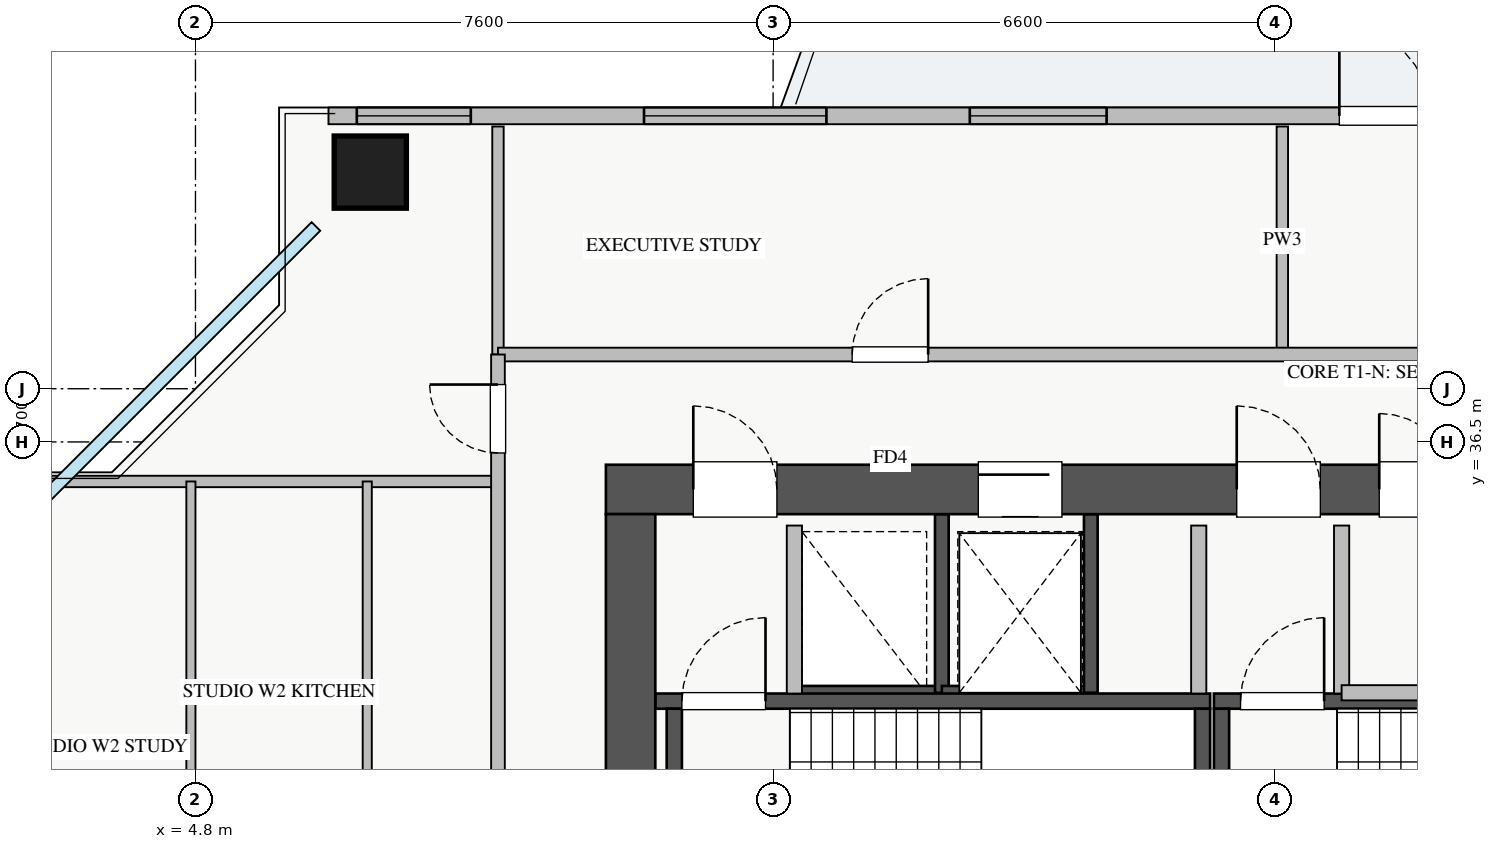
"""IFC4 building model, lengths in metres.
Left out: names, types, materials, properties, quantities, classifications, styles, units other than length and angle.
Written with IfcOpenShell. Run it as: python <this file> out.ifc"""

import sys

from ifc_helpers import new_model, si_unit, direction, frame, frame_2d, origin, origin_2d, place, context, subcontext, project, spatial, rectangle, extrude, source, transform, mapped, element, fill, save


model = new_model("IFC4")
c1 = context("Model", 3, precision=1e-05, world=origin(), true_north=direction((0.0, 1.0)))
c2 = subcontext(c1, "Body", "Model", "MODEL_VIEW")
j1 = project(units=[si_unit("LENGTHUNIT", "METRE"), si_unit("PLANEANGLEUNIT", "RADIAN")], contexts=[c1])
p1 = place(None, origin())
s1 = spatial("IfcSite", under=j1, at=p1, CompositionType="ELEMENT")
p2 = place(p1, origin())
s2 = spatial("IfcBuilding", under=s1, at=p2, CompositionType="ELEMENT")
p3 = place(p2, frame((0.0, 0.0, 176.25)))
s3 = spatial("IfcBuildingStorey", under=s2, at=p3, CompositionType="ELEMENT", Elevation=176.25)
p4 = place(p3, frame((12.68, 33.2, 0.0), z_axis=(0.0, 0.0, 1.0), x_axis=(1.0, 0.0, 0.0)))
e1 = element("IfcWall", 1, at=p4, inside=s3, PredefinedType="SHEAR", context=c2, shape_type="SweptSolid", body=[
    extrude(rectangle(XDim=1.94, YDim=0.18, at=frame_2d((0.97, 0.0))), origin(), (0.0, 0.0, 1.0), 3.07),
])
p5 = place(p3, frame((14.62, 33.2, 0.0), z_axis=(0.0, 0.0, 1.0), x_axis=(0.0, 1.0, 0.0)))
e2 = element("IfcWall", 2, at=p5, inside=s3, PredefinedType="SHEAR", context=c2, shape_type="SweptSolid", body=[
    extrude(rectangle(XDim=2.35, YDim=0.18, at=frame_2d((1.175, 0.0))), origin(), (0.0, 0.0, 1.0), 3.07),
])
p6 = place(p3, frame((14.62, 33.2, 0.0), z_axis=(0.0, 0.0, 1.0), x_axis=(1.0, 0.0, 0.0)))
e3 = element("IfcWall", 3, at=p6, inside=s3, PredefinedType="SHEAR", context=c2, shape_type="SweptSolid", body=[
    extrude(rectangle(XDim=1.96, YDim=0.18, at=frame_2d((0.98, 0.0))), origin(), (0.0, 0.0, 1.0), 3.07),
])
p7 = place(p3, frame((16.58, 33.2, 0.0), z_axis=(0.0, 0.0, 1.0), x_axis=(0.0, 1.0, 0.0)))
e4 = element("IfcWall", 4, at=p7, inside=s3, PredefinedType="SHEAR", context=c2, shape_type="SweptSolid", body=[
    extrude(rectangle(XDim=2.35, YDim=0.18, at=frame_2d((1.175, 0.0))), origin(), (0.0, 0.0, 1.0), 3.07),
])
p8 = place(p3, frame((10.85, 33.09, 0.0), z_axis=(0.0, 0.0, 1.0), x_axis=(1.0, 0.0, 0.0)))
e5 = element("IfcWall", 5, at=p8, inside=s3, PredefinedType="SHEAR", context=c2, shape_type="SweptSolid", body=[
    extrude(rectangle(XDim=7.3, YDim=0.2, at=frame_2d((3.65, 0.0))), origin(), (0.0, 0.0, 1.0), 3.25),
])
p9 = place(p8, frame((0.35, 0.0, 0.0)))
e6 = element("IfcOpeningElement", 6, at=p9, cuts=e5, PredefinedType="OPENING", context=c2, shape_type="SweptSolid", body=[
    extrude(rectangle(XDim=1.1, YDim=2.05, at=frame_2d((0.55, 1.025))), frame((0.0, 0.11, 0.0), z_axis=(0.0, -1.0, 0.0), x_axis=(1.0, 0.0, 0.0)), (0.0, 0.0, 1.0), 0.22),
])
for number, where, z_axis, x_axis in (
    (7, (11.1, 30.05, 0.0), (0.0, 0.0, 1.0), (0.0, 1.0, 0.0)),
    (8, (18.05, 30.05, 0.0), (0.0, 0.0, 1.0), (0.0, 1.0, 0.0)),
):
    element("IfcWall", number, at=place(p3, frame(where, z_axis=z_axis, x_axis=x_axis)), inside=s3, PredefinedType="SHEAR", context=c2, shape_type="SweptSolid", body=[
        extrude(rectangle(XDim=2.94, YDim=0.2, at=frame_2d((1.47, 0.0))), origin(), (0.0, 0.0, 1.0), 3.25),
    ])
p10 = place(p3, frame((18.2, 33.09, 0.0), z_axis=(0.0, 0.0, 1.0), x_axis=(1.0, 0.0, 0.0)))
e9 = element("IfcWall", 9, at=p10, inside=s3, PredefinedType="SHEAR", context=c2, shape_type="SweptSolid", body=[
    extrude(rectangle(XDim=7.15, YDim=0.2, at=frame_2d((3.575, 0.0))), origin(), (0.0, 0.0, 1.0), 3.25),
])
p11 = place(p10, frame((0.35, 0.0, 0.0)))
e10 = element("IfcOpeningElement", 10, at=p11, cuts=e9, PredefinedType="OPENING", context=c2, shape_type="SweptSolid", body=[
    extrude(rectangle(XDim=1.1, YDim=2.05, at=frame_2d((0.55, 1.025))), frame((0.0, 0.11, 0.0), z_axis=(0.0, -1.0, 0.0), x_axis=(1.0, 0.0, 0.0)), (0.0, 0.0, 1.0), 0.22),
])
p12 = place(p3, frame((18.3, 30.05, 0.0), z_axis=(0.0, 0.0, 1.0), x_axis=(0.0, 1.0, 0.0)))
e11 = element("IfcWall", 11, at=p12, inside=s3, PredefinedType="SHEAR", context=c2, shape_type="SweptSolid", body=[
    extrude(rectangle(XDim=2.94, YDim=0.2, at=frame_2d((1.47, 0.0))), origin(), (0.0, 0.0, 1.0), 3.25),
])
p13 = place(p3, frame((10.2, 35.875, 0.0), z_axis=(0.0, 0.0, 1.0), x_axis=(1.0, 0.0, 0.0)))
e12 = element("IfcWall", 12, at=p13, inside=s3, PredefinedType="SHEAR", context=c2, shape_type="SweptSolid", body=[
    extrude(rectangle(XDim=17.6, YDim=0.65, at=frame_2d((8.8, 0.0))), origin(), (0.0, 0.0, 1.0), 3.25),
])
p14 = place(p13, frame((1.15, 0.0, 0.0)))
e13 = element("IfcOpeningElement", 13, at=p14, cuts=e12, PredefinedType="OPENING", context=c2, shape_type="SweptSolid", body=[
    extrude(rectangle(XDim=1.1, YDim=2.05, at=frame_2d((0.55, 1.025))), frame((0.0, 0.335, 0.0), z_axis=(0.0, -1.0, 0.0), x_axis=(1.0, 0.0, 0.0)), (0.0, 0.0, 1.0), 0.67),
])
p15 = place(p13, frame((8.3, 0.0, 0.0)))
e14 = element("IfcOpeningElement", 14, at=p15, cuts=e12, PredefinedType="OPENING", context=c2, shape_type="SweptSolid", body=[
    extrude(rectangle(XDim=1.1, YDim=2.05, at=frame_2d((0.55, 1.025))), frame((0.0, 0.335, 0.0), z_axis=(0.0, -1.0, 0.0), x_axis=(1.0, 0.0, 0.0)), (0.0, 0.0, 1.0), 0.67),
])
p16 = place(p13, frame((4.9, 0.0, 0.0)))
e15 = element("IfcOpeningElement", 15, at=p16, cuts=e12, PredefinedType="OPENING", context=c2, shape_type="SweptSolid", body=[
    extrude(rectangle(XDim=1.1, YDim=2.05, at=frame_2d((0.55, 1.025))), frame((0.0, 0.335, 0.0), z_axis=(0.0, -1.0, 0.0), x_axis=(1.0, 0.0, 0.0)), (0.0, 0.0, 1.0), 0.67),
])
p17 = place(p13, frame((14.74, 0.0, 0.0)))
e16 = element("IfcOpeningElement", 16, at=p17, cuts=e12, PredefinedType="OPENING", context=c2, shape_type="SweptSolid", body=[
    extrude(rectangle(XDim=1.0, YDim=2.05, at=frame_2d((0.5, 1.025))), frame((0.0, 0.335, 0.0), z_axis=(0.0, -1.0, 0.0), x_axis=(1.0, 0.0, 0.0)), (0.0, 0.0, 1.0), 0.67),
])
p18 = place(p13, frame((10.175, 0.0, 0.0)))
e17 = element("IfcOpeningElement", 17, at=p18, cuts=e12, PredefinedType="OPENING", context=c2, shape_type="SweptSolid", body=[
    extrude(rectangle(XDim=1.0, YDim=2.05, at=frame_2d((0.5, 1.025))), frame((0.0, 0.335, 0.0), z_axis=(0.0, -1.0, 0.0), x_axis=(1.0, 0.0, 0.0)), (0.0, 0.0, 1.0), 0.67),
])
p19 = place(p13, frame((12.625, 0.0, 0.0)))
e18 = element("IfcOpeningElement", 18, at=p19, cuts=e12, PredefinedType="OPENING", context=c2, shape_type="SweptSolid", body=[
    extrude(rectangle(XDim=1.0, YDim=2.05, at=frame_2d((0.5, 1.025))), frame((0.0, 0.335, 0.0), z_axis=(0.0, -1.0, 0.0), x_axis=(1.0, 0.0, 0.0)), (0.0, 0.0, 1.0), 0.67),
])
p20 = place(p3, frame((10.525, 29.65, 0.0), z_axis=(0.0, 0.0, 1.0), x_axis=(0.0, 1.0, 0.0)))
e19 = element("IfcWall", 19, at=p20, inside=s3, PredefinedType="SHEAR", context=c2, shape_type="SweptSolid", body=[
    extrude(rectangle(XDim=5.9, YDim=0.65, at=frame_2d((2.95, 0.0))), origin(), (0.0, 0.0, 1.0), 3.25),
])
m1 = source(origin(), c2, "Body", "SweptSolid", [
    extrude(rectangle(XDim=0.95, YDim=0.95, at=origin_2d()), origin(), (0.0, 0.0, 1.0), 3.25),
])
p21 = place(p3, frame((7.1, 40.05, 0.0), z_axis=(0.0, 0.0, 1.0), x_axis=(1.0, 0.0, 0.0)))
e20 = element("IfcColumn", 20, at=p21, inside=s3, PredefinedType="COLUMN", context=c2, shape_type="MappedRepresentation", body=[
    mapped(m1, transform((0.0, 0.0, 0.0), x_axis=(1.0, 0.0, 0.0), y_axis=(0.0, 1.0, 0.0), z_axis=(0.0, 0.0, 1.0), scale=1.0)),
])
p22 = place(p3, frame((6.55, 40.79, 0.0), z_axis=(0.0, 0.0, 1.0), x_axis=(1.0, 0.0, 0.0)))
e21 = element("IfcWall", 21, at=p22, inside=s3, PredefinedType="STANDARD", context=c2, shape_type="SweptSolid", body=[
    extrude(rectangle(XDim=24.9, YDim=0.22, at=frame_2d((12.45, 0.0))), origin(), (0.0, 0.0, 1.0), 2.61),
])
p23 = place(p22, frame((13.3, 0.0, 0.0)))
e22 = element("IfcOpeningElement", 22, at=p23, cuts=e21, PredefinedType="OPENING", context=c2, shape_type="SweptSolid", body=[
    extrude(rectangle(XDim=1.2, YDim=2.1, at=frame_2d((0.6, 1.05))), frame((0.0, 0.12, 0.0), z_axis=(0.0, -1.0, 0.0), x_axis=(1.0, 0.0, 0.0)), (0.0, 0.0, 1.0), 0.24),
])
p24 = place(p22, frame((0.373, 0.0, 0.9)))
e23 = element("IfcOpeningElement", 23, at=p24, cuts=e21, PredefinedType="OPENING", context=c2, shape_type="SweptSolid", body=[
    extrude(rectangle(XDim=1.5, YDim=1.5, at=frame_2d((0.75, 0.75))), frame((0.0, 0.12, 0.0), z_axis=(0.0, -1.0, 0.0), x_axis=(1.0, 0.0, 0.0)), (0.0, 0.0, 1.0), 0.24),
])
p25 = place(p22, frame((8.438, 0.0, 0.9)))
e24 = element("IfcOpeningElement", 24, at=p25, cuts=e21, PredefinedType="OPENING", context=c2, shape_type="SweptSolid", body=[
    extrude(rectangle(XDim=1.8, YDim=1.45, at=frame_2d((0.9, 0.725))), frame((0.0, 0.12, 0.0), z_axis=(0.0, -1.0, 0.0), x_axis=(1.0, 0.0, 0.0)), (0.0, 0.0, 1.0), 0.24),
])
p26 = place(p22, frame((14.813, 0.0, 0.9)))
e25 = element("IfcOpeningElement", 25, at=p26, cuts=e21, PredefinedType="OPENING", context=c2, shape_type="SweptSolid", body=[
    extrude(rectangle(XDim=1.5, YDim=1.45, at=frame_2d((0.75, 0.725))), frame((0.0, 0.12, 0.0), z_axis=(0.0, -1.0, 0.0), x_axis=(1.0, 0.0, 0.0)), (0.0, 0.0, 1.0), 0.24),
])
p27 = place(p22, frame((20.738, 0.0, 0.9)))
e26 = element("IfcOpeningElement", 26, at=p27, cuts=e21, PredefinedType="OPENING", context=c2, shape_type="SweptSolid", body=[
    extrude(rectangle(XDim=2.1, YDim=1.48, at=frame_2d((1.05, 0.74))), frame((0.0, 0.12, 0.0), z_axis=(0.0, -1.0, 0.0), x_axis=(1.0, 0.0, 0.0)), (0.0, 0.0, 1.0), 0.24),
])
p28 = place(p22, frame((4.152, 0.0, 0.9)))
e27 = element("IfcOpeningElement", 27, at=p28, cuts=e21, PredefinedType="OPENING", context=c2, shape_type="SweptSolid", body=[
    extrude(rectangle(XDim=2.4, YDim=1.5, at=frame_2d((1.2, 0.75))), frame((0.0, 0.12, 0.0), z_axis=(0.0, -1.0, 0.0), x_axis=(1.0, 0.0, 0.0)), (0.0, 0.0, 1.0), 0.24),
])
for number, where, z_axis, x_axis in (
    (28, (12.68, 33.19, 0.0), (0.0, 0.0, 1.0), (0.0, 1.0, 0.0)),
    (29, (18.0, 33.19, 0.0), (0.0, 0.0, 1.0), (0.0, 1.0, 0.0)),
    (30, (19.88, 33.19, 0.0), (0.0, 0.0, 1.0), (0.0, 1.0, 0.0)),
):
    element("IfcWall", number, at=place(p3, frame(where, z_axis=z_axis, x_axis=x_axis)), inside=s3, PredefinedType="PARTITIONING", context=c2, shape_type="SweptSolid", body=[
        extrude(rectangle(XDim=2.21, YDim=0.2, at=frame_2d((1.105, 0.0))), origin(), (0.0, 0.0, 1.0), 3.07),
    ])
p29 = place(p3, frame((19.88, 33.2, 0.0), z_axis=(0.0, 0.0, 1.0), x_axis=(1.0, 0.0, 0.0)))
e31 = element("IfcWall", 31, at=p29, inside=s3, PredefinedType="PARTITIONING", context=c2, shape_type="SweptSolid", body=[
    extrude(rectangle(XDim=1.87, YDim=0.2, at=frame_2d((0.935, 0.0))), origin(), (0.0, 0.0, 1.0), 3.07),
])
p30 = place(p3, frame((19.1, 37.65, 0.0), z_axis=(0.0, 0.0, 1.0), x_axis=(0.0, 1.0, 0.0)))
e32 = element("IfcWall", 32, at=p30, inside=s3, PredefinedType="PARTITIONING", context=c2, shape_type="SweptSolid", body=[
    extrude(rectangle(XDim=3.0, YDim=0.15, at=frame_2d((1.5, 0.0))), origin(), (0.0, 0.0, 1.0), 2.815),
])
p31 = place(p3, frame((8.78, 37.65, 0.0), z_axis=(0.0, 0.0, 1.0), x_axis=(0.0, 1.0, 0.0)))
e33 = element("IfcWall", 33, at=p31, inside=s3, PredefinedType="PARTITIONING", context=c2, shape_type="SweptSolid", body=[
    extrude(rectangle(XDim=3.0, YDim=0.15, at=frame_2d((1.5, 0.0))), origin(), (0.0, 0.0, 1.0), 3.07),
])
p32 = place(p3, frame((8.78, 37.65, 0.0), z_axis=(0.0, 0.0, 1.0), x_axis=(1.0, 0.0, 0.0)))
e34 = element("IfcWall", 34, at=p32, inside=s3, PredefinedType="PARTITIONING", context=c2, shape_type="SweptSolid", body=[
    extrude(rectangle(XDim=23.54, YDim=0.18, at=frame_2d((11.77, 0.0))), origin(), (0.0, 0.0, 1.0), 3.07),
])
p33 = place(p32, frame((4.66, 0.0, 0.0)))
e35 = element("IfcOpeningElement", 35, at=p33, cuts=e34, PredefinedType="OPENING", context=c2, shape_type="SweptSolid", body=[
    extrude(rectangle(XDim=1.0, YDim=2.05, at=frame_2d((0.5, 1.025))), frame((0.0, 0.1, 0.0), z_axis=(0.0, -1.0, 0.0), x_axis=(1.0, 0.0, 0.0)), (0.0, 0.0, 1.0), 0.2),
])
p34 = place(p32, frame((16.26, 0.0, 0.0)))
e36 = element("IfcOpeningElement", 36, at=p34, cuts=e34, PredefinedType="OPENING", context=c2, shape_type="SweptSolid", body=[
    extrude(rectangle(XDim=1.0, YDim=2.05, at=frame_2d((0.5, 1.025))), frame((0.0, 0.1, 0.0), z_axis=(0.0, -1.0, 0.0), x_axis=(1.0, 0.0, 0.0)), (0.0, 0.0, 1.0), 0.2),
])
p35 = place(p3, frame((2.4, 35.98, 0.0), z_axis=(0.0, 0.0, 1.0), x_axis=(1.0, 0.0, 0.0)))
e37 = element("IfcWall", 37, at=p35, inside=s3, PredefinedType="PARTITIONING", context=c2, shape_type="SweptSolid", body=[
    extrude(rectangle(XDim=6.38, YDim=0.15, at=frame_2d((3.19, 0.0))), origin(), (0.0, 0.0, 1.0), 3.07),
])
p36 = place(p3, frame((4.74, 29.42, 0.0), z_axis=(0.0, 0.0, 1.0), x_axis=(0.0, 1.0, 0.0)))
e38 = element("IfcWall", 38, at=p36, inside=s3, PredefinedType="PLUMBINGWALL", context=c2, shape_type="SweptSolid", body=[
    extrude(rectangle(XDim=6.56, YDim=0.12, at=frame_2d((3.28, 0.0))), origin(), (0.0, 0.0, 1.0), 3.07),
])
p37 = place(p3, frame((7.06, 29.42, 0.0), z_axis=(0.0, 0.0, 1.0), x_axis=(0.0, 1.0, 0.0)))
e39 = element("IfcWall", 39, at=p37, inside=s3, PredefinedType="PLUMBINGWALL", context=c2, shape_type="SweptSolid", body=[
    extrude(rectangle(XDim=6.56, YDim=0.12, at=frame_2d((3.28, 0.0))), origin(), (0.0, 0.0, 1.0), 2.565),
])
p38 = place(p3, frame((8.78, 8.31, 0.0), z_axis=(0.0, 0.0, 1.0), x_axis=(0.0, 1.0, 0.0)))
e40 = element("IfcWall", 40, at=p38, inside=s3, PredefinedType="PARTITIONING", context=c2, shape_type="SweptSolid", body=[
    extrude(rectangle(XDim=29.34, YDim=0.18, at=frame_2d((14.67, 0.0))), origin(), (0.0, 0.0, 1.0), 3.07),
])
p39 = place(p38, frame((28.045, 0.0, 0.0)))
e41 = element("IfcOpeningElement", 41, at=p39, cuts=e40, PredefinedType="OPENING", context=c2, shape_type="SweptSolid", body=[
    extrude(rectangle(XDim=0.9, YDim=2.05, at=frame_2d((0.45, 1.025))), frame((0.0, 0.1, 0.0), z_axis=(0.0, -1.0, 0.0), x_axis=(1.0, 0.0, 0.0)), (0.0, 0.0, 1.0), 0.2),
])
p40 = place(p38, frame((0.24, 0.0, 0.0)))
e42 = element("IfcOpeningElement", 42, at=p40, cuts=e40, PredefinedType="OPENING", context=c2, shape_type="SweptSolid", body=[
    extrude(rectangle(XDim=0.9, YDim=2.05, at=frame_2d((0.45, 1.025))), frame((0.0, 0.1, 0.0), z_axis=(0.0, -1.0, 0.0), x_axis=(1.0, 0.0, 0.0)), (0.0, 0.0, 1.0), 0.2),
])
p41 = place(p38, frame((7.705, 0.0, 0.0)))
e43 = element("IfcOpeningElement", 43, at=p41, cuts=e40, PredefinedType="OPENING", context=c2, shape_type="SweptSolid", body=[
    extrude(rectangle(XDim=1.0, YDim=2.05, at=frame_2d((0.5, 1.025))), frame((0.0, 0.1, 0.0), z_axis=(0.0, -1.0, 0.0), x_axis=(1.0, 0.0, 0.0)), (0.0, 0.0, 1.0), 0.2),
])
p42 = place(p38, frame((17.39, 0.0, 0.0)))
e44 = element("IfcOpeningElement", 44, at=p42, cuts=e40, PredefinedType="OPENING", context=c2, shape_type="SweptSolid", body=[
    extrude(rectangle(XDim=1.0, YDim=2.05, at=frame_2d((0.5, 1.025))), frame((0.0, 0.1, 0.0), z_axis=(0.0, -1.0, 0.0), x_axis=(1.0, 0.0, 0.0)), (0.0, 0.0, 1.0), 0.2),
])
m2 = source(origin(), c2, "Body", "SweptSolid", [
    extrude(rectangle(XDim=1.2, YDim=2.1, at=frame_2d((0.6, 1.05))), frame((0.0, 0.025, 0.0), z_axis=(0.0, -1.0, 0.0), x_axis=(1.0, 0.0, 0.0)), (0.0, 0.0, 1.0), 0.05),
])
p43 = place(p23, origin())
e45 = element("IfcDoor", 45, at=p43, inside=s3, OperationType="SINGLE_SWING_LEFT", PredefinedType="DOOR", context=c2, shape_type="MappedRepresentation", body=[
    mapped(m2, transform((0.0, 0.0, 0.0), x_axis=(1.0, 0.0, 0.0), y_axis=(0.0, 1.0, 0.0), z_axis=(0.0, 0.0, 1.0), scale=1.0)),
])
fill(e22, e45)
m3 = source(origin(), c2, "Body", "SweptSolid", [
    extrude(rectangle(XDim=1.5, YDim=1.5, at=frame_2d((0.75, 0.75))), frame((0.0, 0.03, 0.0), z_axis=(0.0, -1.0, 0.0), x_axis=(1.0, 0.0, 0.0)), (0.0, 0.0, 1.0), 0.06),
])
p44 = place(p24, origin())
e46 = element("IfcWindow", 46, at=p44, inside=s3, PartitioningType="TRIPLE_PANEL_VERTICAL", PredefinedType="WINDOW", context=c2, shape_type="MappedRepresentation", body=[
    mapped(m3, transform((0.0, 0.0, 0.0), x_axis=(1.0, 0.0, 0.0), y_axis=(0.0, 1.0, 0.0), z_axis=(0.0, 0.0, 1.0), scale=1.0)),
])
fill(e23, e46)
m4 = source(origin(), c2, "Body", "SweptSolid", [
    extrude(rectangle(XDim=1.8, YDim=1.45, at=frame_2d((0.9, 0.725))), frame((0.0, 0.03, 0.0), z_axis=(0.0, -1.0, 0.0), x_axis=(1.0, 0.0, 0.0)), (0.0, 0.0, 1.0), 0.06),
])
p45 = place(p25, origin())
e47 = element("IfcWindow", 47, at=p45, inside=s3, PartitioningType="DOUBLE_PANEL_VERTICAL", PredefinedType="WINDOW", context=c2, shape_type="MappedRepresentation", body=[
    mapped(m4, transform((0.0, 0.0, 0.0), x_axis=(1.0, 0.0, 0.0), y_axis=(0.0, 1.0, 0.0), z_axis=(0.0, 0.0, 1.0), scale=1.0)),
])
fill(e24, e47)
m5 = source(origin(), c2, "Body", "SweptSolid", [
    extrude(rectangle(XDim=1.1, YDim=2.05, at=frame_2d((0.55, 1.025))), frame((0.0, 0.025, 0.0), z_axis=(0.0, -1.0, 0.0), x_axis=(1.0, 0.0, 0.0)), (0.0, 0.0, 1.0), 0.05),
])
p46 = place(p14, origin())
e48 = element("IfcDoor", 48, at=p46, inside=s3, OperationType="SINGLE_SWING_LEFT", PredefinedType="DOOR", context=c2, shape_type="MappedRepresentation", body=[
    mapped(m5, transform((0.0, 0.0, 0.0), x_axis=(1.0, 0.0, 0.0), y_axis=(0.0, 1.0, 0.0), z_axis=(0.0, 0.0, 1.0), scale=1.0)),
])
fill(e13, e48)
p47 = place(p9, origin())
e49 = element("IfcDoor", 49, at=p47, inside=s3, OperationType="SINGLE_SWING_RIGHT", PredefinedType="DOOR", context=c2, shape_type="MappedRepresentation", body=[
    mapped(m5, transform((0.0, 0.0, 0.0), x_axis=(1.0, 0.0, 0.0), y_axis=(0.0, 1.0, 0.0), z_axis=(0.0, 0.0, 1.0), scale=1.0)),
])
fill(e6, e49)
p48 = place(p15, origin())
e50 = element("IfcDoor", 50, at=p48, inside=s3, OperationType="SINGLE_SWING_LEFT", PredefinedType="DOOR", context=c2, shape_type="MappedRepresentation", body=[
    mapped(m5, transform((0.0, 0.0, 0.0), x_axis=(1.0, 0.0, 0.0), y_axis=(0.0, 1.0, 0.0), z_axis=(0.0, 0.0, 1.0), scale=1.0)),
])
fill(e14, e50)
p49 = place(p11, origin())
e51 = element("IfcDoor", 51, at=p49, inside=s3, OperationType="SINGLE_SWING_RIGHT", PredefinedType="DOOR", context=c2, shape_type="MappedRepresentation", body=[
    mapped(m5, transform((0.0, 0.0, 0.0), x_axis=(1.0, 0.0, 0.0), y_axis=(0.0, 1.0, 0.0), z_axis=(0.0, 0.0, 1.0), scale=1.0)),
])
fill(e10, e51)
p50 = place(p16, origin())
e52 = element("IfcDoor", 52, at=p50, inside=s3, OperationType="SLIDING_TO_LEFT", PredefinedType="DOOR", context=c2, shape_type="MappedRepresentation", body=[
    mapped(m5, transform((0.0, 0.0, 0.0), x_axis=(1.0, 0.0, 0.0), y_axis=(0.0, 1.0, 0.0), z_axis=(0.0, 0.0, 1.0), scale=1.0)),
])
fill(e15, e52)
m6 = source(origin(), c2, "Body", "SweptSolid", [
    extrude(rectangle(XDim=1.0, YDim=2.05, at=frame_2d((0.5, 1.025))), frame((0.0, 0.025, 0.0), z_axis=(0.0, -1.0, 0.0), x_axis=(1.0, 0.0, 0.0)), (0.0, 0.0, 1.0), 0.05),
])
p51 = place(p18, origin())
e53 = element("IfcDoor", 53, at=p51, inside=s3, OperationType="SINGLE_SWING_LEFT", PredefinedType="DOOR", context=c2, shape_type="MappedRepresentation", body=[
    mapped(m6, transform((0.0, 0.0, 0.0), x_axis=(1.0, 0.0, 0.0), y_axis=(0.0, 1.0, 0.0), z_axis=(0.0, 0.0, 1.0), scale=1.0)),
])
fill(e17, e53)
p52 = place(p33, origin())
e54 = element("IfcDoor", 54, at=p52, inside=s3, OperationType="SINGLE_SWING_RIGHT", PredefinedType="DOOR", context=c2, shape_type="MappedRepresentation", body=[
    mapped(m6, transform((0.0, 0.0, 0.0), x_axis=(1.0, 0.0, 0.0), y_axis=(0.0, 1.0, 0.0), z_axis=(0.0, 0.0, 1.0), scale=1.0)),
])
fill(e35, e54)
m7 = source(origin(), c2, "Body", "SweptSolid", [
    extrude(rectangle(XDim=0.9, YDim=2.05, at=frame_2d((0.45, 1.025))), frame((0.0, 0.025, 0.0), z_axis=(0.0, -1.0, 0.0), x_axis=(1.0, 0.0, 0.0)), (0.0, 0.0, 1.0), 0.05),
])
p53 = place(p39, origin())
e55 = element("IfcDoor", 55, at=p53, inside=s3, OperationType="SINGLE_SWING_RIGHT", PredefinedType="DOOR", context=c2, shape_type="MappedRepresentation", body=[
    mapped(m7, transform((0.0, 0.0, 0.0), x_axis=(1.0, 0.0, 0.0), y_axis=(0.0, 1.0, 0.0), z_axis=(0.0, 0.0, 1.0), scale=1.0)),
])
fill(e41, e55)
m8 = source(origin(), c2, "Body", "SweptSolid", [
    extrude(rectangle(XDim=2.4, YDim=1.5, at=frame_2d((1.2, 0.75))), frame((0.0, 0.03, 0.0), z_axis=(0.0, -1.0, 0.0), x_axis=(1.0, 0.0, 0.0)), (0.0, 0.0, 1.0), 0.06),
])
p54 = place(p28, origin())
e56 = element("IfcWindow", 56, at=p54, inside=s3, PartitioningType="TRIPLE_PANEL_VERTICAL", PredefinedType="WINDOW", context=c2, shape_type="MappedRepresentation", body=[
    mapped(m8, transform((0.0, 0.0, 0.0), x_axis=(1.0, 0.0, 0.0), y_axis=(0.0, 1.0, 0.0), z_axis=(0.0, 0.0, 1.0), scale=1.0)),
])
fill(e27, e56)
save(model, sys.argv[1])
